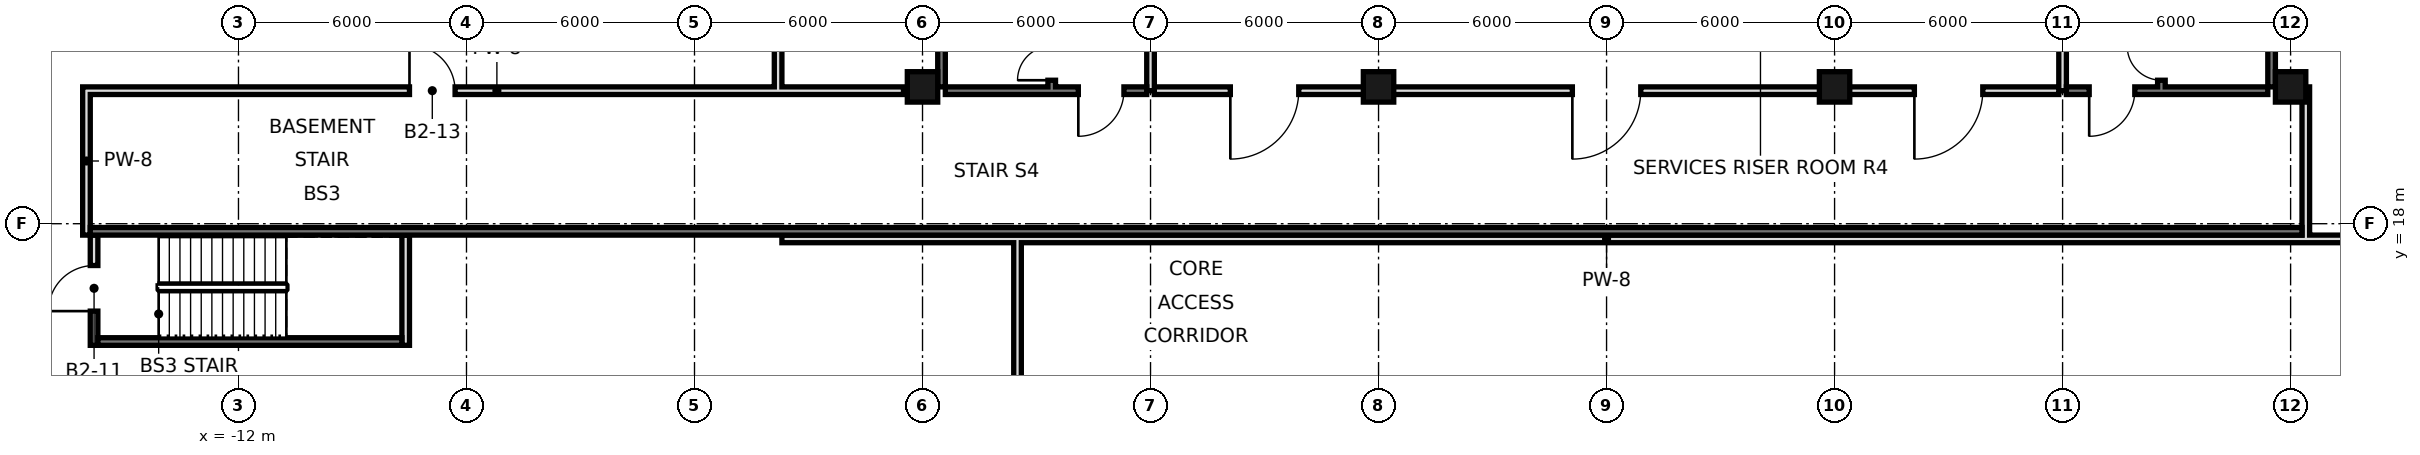
"""IFC4 building model, lengths in metres.
Left out: names, types, materials, properties, quantities, classifications, styles, units other than length and angle.
Written with IfcOpenShell. Run it as: python <this file> out.ifc"""

import sys

from ifc_helpers import new_model, si_unit, direction, frame, frame_2d, origin, origin_2d, place, context, subcontext, project, spatial, rectangle, hollow_rectangle, extrude, element, fill, save


model = new_model("IFC4")
c1 = context("Model", 3, precision=1e-05, world=origin(), true_north=direction((0.0, 1.0)))
c2 = subcontext(c1, "Body", "Model", "MODEL_VIEW")
j1 = project(units=[si_unit("LENGTHUNIT", "METRE"), si_unit("PLANEANGLEUNIT", "RADIAN")], contexts=[c1])
p1 = place(None, origin())
s1 = spatial("IfcSite", under=j1, at=p1, CompositionType="ELEMENT")
p2 = place(p1, origin())
s2 = spatial("IfcBuilding", under=s1, at=p2, CompositionType="ELEMENT")
p3 = place(p2, frame((0.0, 0.0, -9.0)))
s3 = spatial("IfcBuildingStorey", under=s2, at=p3, CompositionType="ELEMENT", Elevation=-9.0)
for number, where, z_axis, x_axis in (
    (1, (6.0, 21.6, 0.0), (0.0, 0.0, 1.0), (1.0, 0.0, 0.0)),
    (2, (18.0, 21.6, 0.0), (0.0, 0.0, 1.0), (1.0, 0.0, 0.0)),
    (3, (30.0, 21.6, 0.0), (0.0, 0.0, 1.0), (1.0, 0.0, 0.0)),
    (4, (42.0, 21.6, 0.0), (0.0, 0.0, 1.0), (1.0, 0.0, 0.0)),
):
    element("IfcColumn", number, at=place(p3, frame(where, z_axis=z_axis, x_axis=x_axis)), inside=s3, PredefinedType="COLUMN", context=c2, shape_type="SweptSolid", body=[
        extrude(hollow_rectangle(XDim=0.8, YDim=0.8, WallThickness=0.07, at=origin_2d()), origin(), (0.0, 0.0, 1.0), 4.5),
    ])
p4 = place(p3, frame((-16.0, 17.7, 0.0), z_axis=(0.0, 0.0, 1.0), x_axis=(0.0, 1.0, 0.0)))
e5 = element("IfcWall", 5, at=p4, inside=s3, PredefinedType="SOLIDWALL", context=c2, shape_type="SweptSolid", body=[
    extrude(rectangle(XDim=3.9, YDim=0.2, at=frame_2d((1.95, 0.0))), origin(), (0.0, 0.0, 1.0), 4.14),
])
p5 = place(p3, frame((-15.8, 14.8, 0.0), z_axis=(0.0, 0.0, 1.0), x_axis=(0.0, 1.0, 0.0)))
e6 = element("IfcWall", 6, at=p5, inside=s3, PredefinedType="SOLIDWALL", context=c2, shape_type="SweptSolid", body=[
    extrude(rectangle(XDim=2.9, YDim=0.2, at=frame_2d((1.45, 0.0))), origin(), (0.0, 0.0, 1.0), 4.14),
])
p6 = place(p5, frame((0.9, 0.0, 0.0)))
e7 = element("IfcOpeningElement", 7, at=p6, cuts=e6, PredefinedType="OPENING", context=c2, shape_type="SweptSolid", body=[
    extrude(rectangle(XDim=1.2, YDim=2.4, at=frame_2d((0.6, 1.2))), frame((0.0, 0.11, 0.0), z_axis=(0.0, -1.0, 0.0), x_axis=(1.0, 0.0, 0.0)), (0.0, 0.0, 1.0), 0.22),
])
p7 = place(p3, frame((-7.6, 14.8, 0.0), z_axis=(0.0, 0.0, 1.0), x_axis=(0.0, 1.0, 0.0)))
e8 = element("IfcWall", 8, at=p7, inside=s3, PredefinedType="SOLIDWALL", context=c2, shape_type="SweptSolid", body=[
    extrude(rectangle(XDim=2.9, YDim=0.2, at=frame_2d((1.45, 0.0))), origin(), (0.0, 0.0, 1.0), 4.14),
])
p8 = place(p3, frame((2.2, 21.6, 0.0), z_axis=(0.0, 0.0, 1.0), x_axis=(0.0, 1.0, 0.0)))
e9 = element("IfcWall", 9, at=p8, inside=s3, PredefinedType="SOLIDWALL", context=c2, shape_type="SweptSolid", body=[
    extrude(rectangle(XDim=28.0, YDim=0.2, at=frame_2d((14.0, 0.0))), origin(), (0.0, 0.0, 1.0), 3.04),
])
p9 = place(p3, frame((8.5, -11.0, 0.0), z_axis=(0.0, 0.0, 1.0), x_axis=(0.0, 1.0, 0.0)))
e10 = element("IfcWall", 10, at=p9, inside=s3, PredefinedType="SOLIDWALL", context=c2, shape_type="SweptSolid", body=[
    extrude(rectangle(XDim=28.5, YDim=0.2, at=frame_2d((14.25, 0.0))), origin(), (0.0, 0.0, 1.0), 3.04),
])
p10 = place(p9, frame((0.25, 0.0, 0.0)))
e11 = element("IfcOpeningElement", 11, at=p10, cuts=e10, PredefinedType="OPENING", context=c2, shape_type="SweptSolid", body=[
    extrude(rectangle(XDim=5.3, YDim=2.4, at=frame_2d((2.65, 1.2))), frame((0.0, 0.11, 0.0), z_axis=(0.0, -1.0, 0.0), x_axis=(1.0, 0.0, 0.0)), (0.0, 0.0, 1.0), 0.22),
])
p11 = place(p9, frame((14.25, 0.0, 0.0)))
e12 = element("IfcOpeningElement", 12, at=p11, cuts=e10, PredefinedType="OPENING", context=c2, shape_type="SweptSolid", body=[
    extrude(rectangle(XDim=5.5, YDim=2.4, at=frame_2d((2.75, 1.2))), frame((0.0, 0.11, 0.0), z_axis=(0.0, -1.0, 0.0), x_axis=(1.0, 0.0, 0.0)), (0.0, 0.0, 1.0), 0.22),
])
p12 = place(p3, frame((42.4, 17.7, 0.0), z_axis=(0.0, 0.0, 1.0), x_axis=(0.0, 1.0, 0.0)))
e13 = element("IfcWall", 13, at=p12, inside=s3, PredefinedType="SOLIDWALL", context=c2, shape_type="SweptSolid", body=[
    extrude(rectangle(XDim=3.9, YDim=0.2, at=frame_2d((1.95, 0.0))), origin(), (0.0, 0.0, 1.0), 4.14),
])
p13 = place(p3, frame((-15.7, 14.9, 0.0), z_axis=(0.0, 0.0, 1.0), x_axis=(1.0, 0.0, 0.0)))
e14 = element("IfcWall", 14, at=p13, inside=s3, PredefinedType="SOLIDWALL", context=c2, shape_type="SweptSolid", body=[
    extrude(rectangle(XDim=8.0, YDim=0.2, at=frame_2d((4.0, 0.0))), origin(), (0.0, 0.0, 1.0), 4.14),
])
p14 = place(p3, frame((2.3, 17.6, 0.0), z_axis=(0.0, 0.0, 1.0), x_axis=(1.0, 0.0, 0.0)))
e15 = element("IfcWall", 15, at=p14, inside=s3, PredefinedType="SOLIDWALL", context=c2, shape_type="SweptSolid", body=[
    extrude(rectangle(XDim=43.4, YDim=0.2, at=frame_2d((21.7, 0.0))), origin(), (0.0, 0.0, 1.0), 3.04),
])
p15 = place(p3, frame((-15.9, 17.8, 0.0), z_axis=(0.0, 0.0, 1.0), x_axis=(1.0, 0.0, 0.0)))
e16 = element("IfcWall", 16, at=p15, inside=s3, PredefinedType="SOLIDWALL", context=c2, shape_type="SweptSolid", body=[
    extrude(rectangle(XDim=58.2, YDim=0.2, at=frame_2d((29.1, 0.0))), origin(), (0.0, 0.0, 1.0), 3.04),
])
p16 = place(p3, frame((-15.9, 21.5, 0.0), z_axis=(0.0, 0.0, 1.0), x_axis=(1.0, 0.0, 0.0)))
e17 = element("IfcWall", 17, at=p16, inside=s3, PredefinedType="SOLIDWALL", context=c2, shape_type="SweptSolid", body=[
    extrude(rectangle(XDim=21.4, YDim=0.2, at=frame_2d((10.7, 0.0))), origin(), (0.0, 0.0, 1.0), 3.04),
])
p17 = place(p16, frame((8.4, 0.0, 0.0)))
e18 = element("IfcOpeningElement", 18, at=p17, cuts=e17, PredefinedType="OPENING", context=c2, shape_type="SweptSolid", body=[
    extrude(rectangle(XDim=1.2, YDim=2.4, at=frame_2d((0.6, 1.2))), frame((0.0, 0.11, 0.0), z_axis=(0.0, -1.0, 0.0), x_axis=(1.0, 0.0, 0.0)), (0.0, 0.0, 1.0), 0.22),
])
for number, where, z_axis, x_axis in (
    (19, (6.5, 21.6, 0.0), (0.0, 0.0, 1.0), (0.0, 1.0, 0.0)),
    (20, (41.5, 21.6, 0.0), (0.0, 0.0, 1.0), (0.0, 1.0, 0.0)),
):
    element("IfcWall", number, at=place(p3, frame(where, z_axis=z_axis, x_axis=x_axis)), inside=s3, PredefinedType="SOLIDWALL", context=c2, shape_type="SweptSolid", body=[
        extrude(rectangle(XDim=23.5, YDim=0.2, at=frame_2d((11.75, 0.0))), origin(), (0.0, 0.0, 1.0), 4.14),
    ])
p18 = place(p3, frame((12.1, 21.5, 0.0), z_axis=(0.0, 0.0, 1.0), x_axis=(1.0, 0.0, 0.0)))
e21 = element("IfcWall", 21, at=p18, inside=s3, PredefinedType="SOLIDWALL", context=c2, shape_type="SweptSolid", body=[
    extrude(rectangle(XDim=23.8, YDim=0.2, at=frame_2d((11.9, 0.0))), origin(), (0.0, 0.0, 1.0), 3.04),
])
p19 = place(p18, frame((2.0, 0.0, 0.0)))
e22 = element("IfcOpeningElement", 22, at=p19, cuts=e21, PredefinedType="OPENING", context=c2, shape_type="SweptSolid", body=[
    extrude(rectangle(XDim=1.8, YDim=2.1, at=frame_2d((0.9, 1.05))), frame((0.0, 0.11, 0.0), z_axis=(0.0, -1.0, 0.0), x_axis=(1.0, 0.0, 0.0)), (0.0, 0.0, 1.0), 0.22),
])
p20 = place(p18, frame((11.0, 0.0, 0.0)))
e23 = element("IfcOpeningElement", 23, at=p20, cuts=e21, PredefinedType="OPENING", context=c2, shape_type="SweptSolid", body=[
    extrude(rectangle(XDim=1.8, YDim=2.1, at=frame_2d((0.9, 1.05))), frame((0.0, 0.11, 0.0), z_axis=(0.0, -1.0, 0.0), x_axis=(1.0, 0.0, 0.0)), (0.0, 0.0, 1.0), 0.22),
])
p21 = place(p18, frame((20.0, 0.0, 0.0)))
e24 = element("IfcOpeningElement", 24, at=p21, cuts=e21, PredefinedType="OPENING", context=c2, shape_type="SweptSolid", body=[
    extrude(rectangle(XDim=1.8, YDim=2.1, at=frame_2d((0.9, 1.05))), frame((0.0, 0.11, 0.0), z_axis=(0.0, -1.0, 0.0), x_axis=(1.0, 0.0, 0.0)), (0.0, 0.0, 1.0), 0.22),
])
for number, where, z_axis, x_axis in (
    (25, (12.0, 21.5, 0.0), (0.0, 0.0, 1.0), (0.0, 1.0, 0.0)),
    (26, (36.0, 21.5, 0.0), (0.0, 0.0, 1.0), (0.0, 1.0, 0.0)),
):
    element("IfcWall", number, at=place(p3, frame(where, z_axis=z_axis, x_axis=x_axis)), inside=s3, PredefinedType="PARTITIONING", context=c2, shape_type="SweptSolid", body=[
        extrude(rectangle(XDim=6.0, YDim=0.2, at=frame_2d((3.0, 0.0))), origin(), (0.0, 0.0, 1.0), 3.04),
    ])
p22 = place(p3, frame((38.6, 21.5, 0.0), z_axis=(0.0, 0.0, 1.0), x_axis=(0.0, 1.0, 0.0)))
e27 = element("IfcWall", 27, at=p22, inside=s3, PredefinedType="SOLIDWALL", context=c2, shape_type="SweptSolid", body=[
    extrude(rectangle(XDim=23.5, YDim=0.2, at=frame_2d((11.75, 0.0))), origin(), (0.0, 0.0, 1.0), 3.04),
])
p23 = place(p22, frame((8.7, 0.0, 0.0)))
e28 = element("IfcOpeningElement", 28, at=p23, cuts=e27, PredefinedType="OPENING", context=c2, shape_type="SweptSolid", body=[
    extrude(rectangle(XDim=1.0, YDim=2.1, at=frame_2d((0.5, 1.05))), frame((0.0, 0.11, 0.0), z_axis=(0.0, -1.0, 0.0), x_axis=(1.0, 0.0, 0.0)), (0.0, 0.0, 1.0), 0.22),
])
p24 = place(p22, frame((13.35, 0.0, 0.0)))
e29 = element("IfcOpeningElement", 29, at=p24, cuts=e27, PredefinedType="OPENING", context=c2, shape_type="SweptSolid", body=[
    extrude(rectangle(XDim=1.0, YDim=2.1, at=frame_2d((0.5, 1.05))), frame((0.0, 0.11, 0.0), z_axis=(0.0, -1.0, 0.0), x_axis=(1.0, 0.0, 0.0)), (0.0, 0.0, 1.0), 0.22),
])
p25 = place(p22, frame((22.2, 0.0, 0.0)))
e30 = element("IfcOpeningElement", 30, at=p25, cuts=e27, PredefinedType="OPENING", context=c2, shape_type="SweptSolid", body=[
    extrude(rectangle(XDim=1.0, YDim=2.1, at=frame_2d((0.5, 1.05))), frame((0.0, 0.11, 0.0), z_axis=(0.0, -1.0, 0.0), x_axis=(1.0, 0.0, 0.0)), (0.0, 0.0, 1.0), 0.22),
])
p26 = place(p22, frame((0.275, 0.0, 0.0)))
e31 = element("IfcOpeningElement", 31, at=p26, cuts=e27, PredefinedType="OPENING", context=c2, shape_type="SweptSolid", body=[
    extrude(rectangle(XDim=0.9, YDim=2.1, at=frame_2d((0.45, 1.05))), frame((0.0, 0.11, 0.0), z_axis=(0.0, -1.0, 0.0), x_axis=(1.0, 0.0, 0.0)), (0.0, 0.0, 1.0), 0.22),
])
p27 = place(p3, frame((9.4, 21.5, 0.0), z_axis=(0.0, 0.0, 1.0), x_axis=(0.0, 1.0, 0.0)))
e32 = element("IfcWall", 32, at=p27, inside=s3, PredefinedType="SOLIDWALL", context=c2, shape_type="SweptSolid", body=[
    extrude(rectangle(XDim=23.5, YDim=0.2, at=frame_2d((11.75, 0.0))), origin(), (0.0, 0.0, 1.0), 3.04),
])
p28 = place(p27, frame((7.1, 0.0, 0.0)))
e33 = element("IfcOpeningElement", 33, at=p28, cuts=e32, PredefinedType="OPENING", context=c2, shape_type="SweptSolid", body=[
    extrude(rectangle(XDim=1.1, YDim=2.1, at=frame_2d((0.55, 1.05))), frame((0.0, 0.11, 0.0), z_axis=(0.0, -1.0, 0.0), x_axis=(1.0, 0.0, 0.0)), (0.0, 0.0, 1.0), 0.22),
])
p29 = place(p27, frame((10.2, 0.0, 0.0)))
e34 = element("IfcOpeningElement", 34, at=p29, cuts=e32, PredefinedType="OPENING", context=c2, shape_type="SweptSolid", body=[
    extrude(rectangle(XDim=1.1, YDim=2.1, at=frame_2d((0.55, 1.05))), frame((0.0, 0.11, 0.0), z_axis=(0.0, -1.0, 0.0), x_axis=(1.0, 0.0, 0.0)), (0.0, 0.0, 1.0), 0.22),
])
p30 = place(p27, frame((13.3, 0.0, 0.0)))
e35 = element("IfcOpeningElement", 35, at=p30, cuts=e32, PredefinedType="OPENING", context=c2, shape_type="SweptSolid", body=[
    extrude(rectangle(XDim=1.1, YDim=2.1, at=frame_2d((0.55, 1.05))), frame((0.0, 0.11, 0.0), z_axis=(0.0, -1.0, 0.0), x_axis=(1.0, 0.0, 0.0)), (0.0, 0.0, 1.0), 0.22),
])
p31 = place(p27, frame((22.2, 0.0, 0.0)))
e36 = element("IfcOpeningElement", 36, at=p31, cuts=e32, PredefinedType="OPENING", context=c2, shape_type="SweptSolid", body=[
    extrude(rectangle(XDim=1.0, YDim=2.1, at=frame_2d((0.5, 1.05))), frame((0.0, 0.11, 0.0), z_axis=(0.0, -1.0, 0.0), x_axis=(1.0, 0.0, 0.0)), (0.0, 0.0, 1.0), 0.22),
])
p32 = place(p27, frame((0.275, 0.0, 0.0)))
e37 = element("IfcOpeningElement", 37, at=p32, cuts=e32, PredefinedType="OPENING", context=c2, shape_type="SweptSolid", body=[
    extrude(rectangle(XDim=0.9, YDim=2.1, at=frame_2d((0.45, 1.05))), frame((0.0, 0.11, 0.0), z_axis=(0.0, -1.0, 0.0), x_axis=(1.0, 0.0, 0.0)), (0.0, 0.0, 1.0), 0.22),
])
p33 = place(p3, frame((36.1, 21.5, 0.0), z_axis=(0.0, 0.0, 1.0), x_axis=(1.0, 0.0, 0.0)))
e38 = element("IfcWall", 38, at=p33, inside=s3, PredefinedType="SOLIDWALL", context=c2, shape_type="SweptSolid", body=[
    extrude(rectangle(XDim=5.3, YDim=0.2, at=frame_2d((2.65, 0.0))), origin(), (0.0, 0.0, 1.0), 3.04),
])
p34 = place(p33, frame((0.6, 0.0, 0.0)))
e39 = element("IfcOpeningElement", 39, at=p34, cuts=e38, PredefinedType="OPENING", context=c2, shape_type="SweptSolid", body=[
    extrude(rectangle(XDim=1.2, YDim=2.1, at=frame_2d((0.6, 1.05))), frame((0.0, 0.11, 0.0), z_axis=(0.0, -1.0, 0.0), x_axis=(1.0, 0.0, 0.0)), (0.0, 0.0, 1.0), 0.22),
])
p35 = place(p3, frame((6.6, 21.5, 0.0), z_axis=(0.0, 0.0, 1.0), x_axis=(1.0, 0.0, 0.0)))
e40 = element("IfcWall", 40, at=p35, inside=s3, PredefinedType="SOLIDWALL", context=c2, shape_type="SweptSolid", body=[
    extrude(rectangle(XDim=5.3, YDim=0.2, at=frame_2d((2.65, 0.0))), origin(), (0.0, 0.0, 1.0), 3.04),
])
p36 = place(p35, frame((3.5, 0.0, 0.0)))
e41 = element("IfcOpeningElement", 41, at=p36, cuts=e40, PredefinedType="OPENING", context=c2, shape_type="SweptSolid", body=[
    extrude(rectangle(XDim=1.2, YDim=2.1, at=frame_2d((0.6, 1.05))), frame((0.0, 0.11, 0.0), z_axis=(0.0, -1.0, 0.0), x_axis=(1.0, 0.0, 0.0)), (0.0, 0.0, 1.0), 0.22),
])
p37 = place(p6, origin())
e42 = element("IfcDoor", 42, at=p37, inside=s3, OperationType="SINGLE_SWING_LEFT", PredefinedType="DOOR", context=c2, shape_type="SweptSolid", body=[
    extrude(rectangle(XDim=1.2, YDim=2.4, at=frame_2d((0.6, 1.2))), frame((0.0, 0.025, 0.0), z_axis=(0.0, -1.0, 0.0), x_axis=(1.0, 0.0, 0.0)), (0.0, 0.0, 1.0), 0.05),
])
fill(e7, e42)
p38 = place(p17, origin())
e43 = element("IfcDoor", 43, at=p38, inside=s3, OperationType="SINGLE_SWING_LEFT", PredefinedType="DOOR", context=c2, shape_type="SweptSolid", body=[
    extrude(rectangle(XDim=1.2, YDim=2.4, at=frame_2d((0.6, 1.2))), frame((0.0, 0.025, 0.0), z_axis=(0.0, -1.0, 0.0), x_axis=(1.0, 0.0, 0.0)), (0.0, 0.0, 1.0), 0.05),
])
fill(e18, e43)
p39 = place(p19, frame((1.8, 0.0, 0.0), z_axis=(0.0, 0.0, 1.0), x_axis=(-1.0, 0.0, 0.0)))
e44 = element("IfcDoor", 44, at=p39, inside=s3, OperationType="SINGLE_SWING_RIGHT", PredefinedType="DOOR", context=c2, shape_type="SweptSolid", body=[
    extrude(rectangle(XDim=1.8, YDim=2.1, at=frame_2d((0.9, 1.05))), frame((0.0, 0.025, 0.0), z_axis=(0.0, -1.0, 0.0), x_axis=(1.0, 0.0, 0.0)), (0.0, 0.0, 1.0), 0.05),
])
fill(e22, e44)
p40 = place(p20, frame((1.8, 0.0, 0.0), z_axis=(0.0, 0.0, 1.0), x_axis=(-1.0, 0.0, 0.0)))
e45 = element("IfcDoor", 45, at=p40, inside=s3, OperationType="SINGLE_SWING_RIGHT", PredefinedType="DOOR", context=c2, shape_type="SweptSolid", body=[
    extrude(rectangle(XDim=1.8, YDim=2.1, at=frame_2d((0.9, 1.05))), frame((0.0, 0.025, 0.0), z_axis=(0.0, -1.0, 0.0), x_axis=(1.0, 0.0, 0.0)), (0.0, 0.0, 1.0), 0.05),
])
fill(e23, e45)
p41 = place(p21, frame((1.8, 0.0, 0.0), z_axis=(0.0, 0.0, 1.0), x_axis=(-1.0, 0.0, 0.0)))
e46 = element("IfcDoor", 46, at=p41, inside=s3, OperationType="SINGLE_SWING_RIGHT", PredefinedType="DOOR", context=c2, shape_type="SweptSolid", body=[
    extrude(rectangle(XDim=1.8, YDim=2.1, at=frame_2d((0.9, 1.05))), frame((0.0, 0.025, 0.0), z_axis=(0.0, -1.0, 0.0), x_axis=(1.0, 0.0, 0.0)), (0.0, 0.0, 1.0), 0.05),
])
fill(e24, e46)
p42 = place(p36, frame((1.2, 0.0, 0.0), z_axis=(0.0, 0.0, 1.0), x_axis=(-1.0, 0.0, 0.0)))
e47 = element("IfcDoor", 47, at=p42, inside=s3, OperationType="SINGLE_SWING_RIGHT", PredefinedType="DOOR", context=c2, shape_type="SweptSolid", body=[
    extrude(rectangle(XDim=1.2, YDim=2.1, at=frame_2d((0.6, 1.05))), frame((0.0, 0.025, 0.0), z_axis=(0.0, -1.0, 0.0), x_axis=(1.0, 0.0, 0.0)), (0.0, 0.0, 1.0), 0.05),
])
fill(e41, e47)
p43 = place(p34, frame((1.2, 0.0, 0.0), z_axis=(0.0, 0.0, 1.0), x_axis=(-1.0, 0.0, 0.0)))
e48 = element("IfcDoor", 48, at=p43, inside=s3, OperationType="SINGLE_SWING_RIGHT", PredefinedType="DOOR", context=c2, shape_type="SweptSolid", body=[
    extrude(rectangle(XDim=1.2, YDim=2.1, at=frame_2d((0.6, 1.05))), frame((0.0, 0.025, 0.0), z_axis=(0.0, -1.0, 0.0), x_axis=(1.0, 0.0, 0.0)), (0.0, 0.0, 1.0), 0.05),
])
fill(e39, e48)
p44 = place(p32, origin())
e49 = element("IfcDoor", 49, at=p44, inside=s3, OperationType="SINGLE_SWING_LEFT", PredefinedType="DOOR", context=c2, shape_type="SweptSolid", body=[
    extrude(rectangle(XDim=0.9, YDim=2.1, at=frame_2d((0.45, 1.05))), frame((0.0, 0.025, 0.0), z_axis=(0.0, -1.0, 0.0), x_axis=(1.0, 0.0, 0.0)), (0.0, 0.0, 1.0), 0.05),
])
fill(e37, e49)
p45 = place(p26, frame((0.9, 0.0, 0.0), z_axis=(0.0, 0.0, 1.0), x_axis=(-1.0, 0.0, 0.0)))
e50 = element("IfcDoor", 50, at=p45, inside=s3, OperationType="SINGLE_SWING_LEFT", PredefinedType="DOOR", context=c2, shape_type="SweptSolid", body=[
    extrude(rectangle(XDim=0.9, YDim=2.1, at=frame_2d((0.45, 1.05))), frame((0.0, 0.025, 0.0), z_axis=(0.0, -1.0, 0.0), x_axis=(1.0, 0.0, 0.0)), (0.0, 0.0, 1.0), 0.05),
])
fill(e31, e50)
save(model, sys.argv[1])
